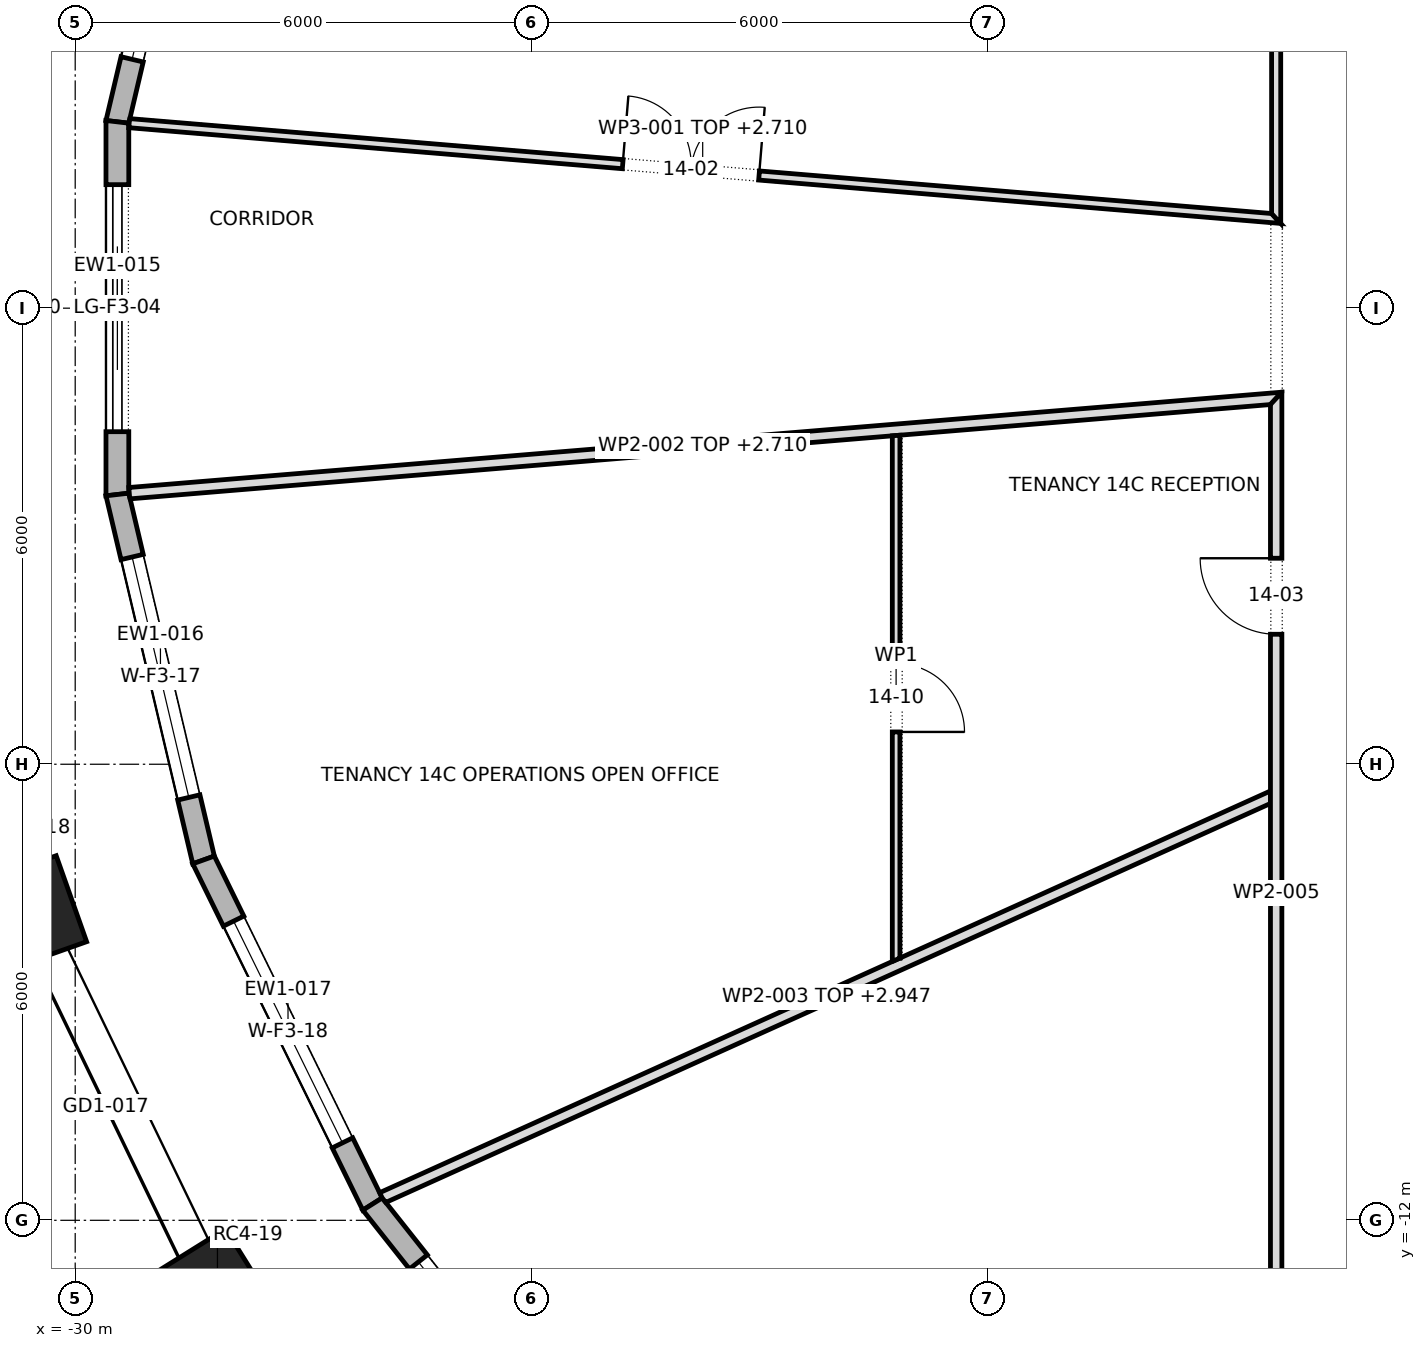
"""IFC4 building model, lengths in metres.
Left out: names, types, materials, properties, quantities, classifications, styles, units other than length and angle.
Written with IfcOpenShell. Run it as: python <this file> out.ifc"""

import sys

from ifc_helpers import new_model, si_unit, direction, frame, frame_2d, origin, origin_2d, place, context, subcontext, project, spatial, polyline, rectangle, outline, extrude, element, fill, save


model = new_model("IFC4")
c1 = context("Model", 3, precision=1e-05, world=origin(), true_north=direction((0.0, 1.0)))
c2 = subcontext(c1, "Body", "Model", "MODEL_VIEW")
j1 = project(units=[si_unit("LENGTHUNIT", "METRE"), si_unit("PLANEANGLEUNIT", "RADIAN")], contexts=[c1])
p1 = place(None, origin())
s1 = spatial("IfcSite", under=j1, at=p1, CompositionType="ELEMENT")
p2 = place(p1, origin())
s2 = spatial("IfcBuilding", under=s1, at=p2, CompositionType="ELEMENT")
p3 = place(p2, frame((0.0, 0.0, 210.9)))
s3 = spatial("IfcBuildingStorey", under=s2, at=p3, CompositionType="ELEMENT", Elevation=210.9)
for number, where, z_axis, x_axis in (
    (1, (-30.521, -7.936, 0.0), (0.0, 0.0, 1.0), (0.334, -0.943, 0.0)),
    (2, (-28.129, -12.887, 0.0), (0.0, 0.0, 1.0), (0.529, -0.849, 0.0)),
):
    element("IfcColumn", number, at=place(p3, frame(where, z_axis=z_axis, x_axis=x_axis)), inside=s3, PredefinedType="COLUMN", context=c2, shape_type="SweptSolid", body=[
        extrude(rectangle(XDim=1.2, YDim=1.0, at=origin_2d()), origin(), (0.0, 0.0, 1.0), 4.0),
    ])
p4 = place(p3, frame((-28.311, 7.259, 0.0), z_axis=(0.0, 0.0, 1.0), x_axis=(-0.229535186351, -0.973300363828, 0.0)))
e3 = element("IfcWall", 3, at=p4, inside=s3, PredefinedType="STANDARD", context=c2, shape_type="SweptSolid", body=[
    extrude(outline(polyline([(-0.017, -0.15), (4.957, -0.15), (4.922, 0.15), (0.017, 0.15), (-0.017, -0.15)])), origin(), (0.0, 0.0, 1.0), 3.7),
])
p5 = place(p4, frame((0.845, 0.0, 0.6)))
e4 = element("IfcOpeningElement", 4, at=p5, cuts=e3, PredefinedType="OPENING", context=c2, shape_type="SweptSolid", body=[
    extrude(rectangle(XDim=3.25, YDim=2.65, at=frame_2d((1.625, 1.325))), frame((0.0, 0.162, 0.0), z_axis=(0.0, -1.0, 0.0), x_axis=(1.0, 0.0, 0.0)), (0.0, 0.0, 1.0), 0.324),
])
p6 = place(p3, frame((-29.445, 2.451, 0.0), z_axis=(0.0, 0.0, 1.0), x_axis=(0.0, -1.0, 0.0)))
e5 = element("IfcWall", 5, at=p6, inside=s3, PredefinedType="STANDARD", context=c2, shape_type="SweptSolid", body=[
    extrude(outline(polyline([(-0.017, -0.15), (4.92, -0.15), (4.885, 0.15), (0.017, 0.15), (-0.017, -0.15)])), origin(), (0.0, 0.0, 1.0), 3.7),
])
p7 = place(p6, frame((0.826, 0.0, 0.0)))
e6 = element("IfcOpeningElement", 6, at=p7, cuts=e5, PredefinedType="OPENING", context=c2, shape_type="SweptSolid", body=[
    extrude(rectangle(XDim=3.25, YDim=3.25, at=frame_2d((1.625, 1.625))), frame((0.0, 0.162, 0.0), z_axis=(0.0, -1.0, 0.0), x_axis=(1.0, 0.0, 0.0)), (0.0, 0.0, 1.0), 0.324),
])
p8 = place(p3, frame((-29.445, -2.451, 0.0), z_axis=(0.0, 0.0, 1.0), x_axis=(0.229535186351, -0.973300363828, 0.0)))
e7 = element("IfcWall", 7, at=p8, inside=s3, PredefinedType="STANDARD", context=c2, shape_type="SweptSolid", body=[
    extrude(outline(polyline([(-0.017, -0.15), (4.956, -0.15), (4.923, 0.15), (0.017, 0.15), (-0.017, -0.15)])), origin(), (0.0, 0.0, 1.0), 3.7),
])
p9 = place(p8, frame((0.845, 0.0, 0.6)))
e8 = element("IfcOpeningElement", 8, at=p9, cuts=e7, PredefinedType="OPENING", context=c2, shape_type="SweptSolid", body=[
    extrude(rectangle(XDim=3.25, YDim=2.65, at=frame_2d((1.625, 1.325))), frame((0.0, 0.162, 0.0), z_axis=(0.0, -1.0, 0.0), x_axis=(1.0, 0.0, 0.0)), (0.0, 0.0, 1.0), 0.324),
])
p10 = place(p3, frame((-28.311, -7.259, 0.0), z_axis=(0.0, 0.0, 1.0), x_axis=(0.440773193145, -0.89761851151, 0.0)))
e9 = element("IfcWall", 9, at=p10, inside=s3, PredefinedType="STANDARD", context=c2, shape_type="SweptSolid", body=[
    extrude(outline(polyline([(-0.017, -0.15), (5.059, -0.15), (5.027, 0.15), (0.017, 0.15), (-0.017, -0.15)])), origin(), (0.0, 0.0, 1.0), 3.7),
])
p11 = place(p10, frame((0.896, 0.0, 0.6)))
e10 = element("IfcOpeningElement", 10, at=p11, cuts=e9, PredefinedType="OPENING", context=c2, shape_type="SweptSolid", body=[
    extrude(rectangle(XDim=3.25, YDim=2.65, at=frame_2d((1.625, 1.325))), frame((0.0, 0.162, 0.0), z_axis=(0.0, -1.0, 0.0), x_axis=(1.0, 0.0, 0.0)), (0.0, 0.0, 1.0), 0.324),
])
p12 = place(p3, frame((-26.088, -11.786, 0.0), z_axis=(0.0, 0.0, 1.0), x_axis=(0.620870264345, -0.783913333763, 0.0)))
e11 = element("IfcWall", 11, at=p12, inside=s3, PredefinedType="STANDARD", context=c2, shape_type="SweptSolid", body=[
    extrude(outline(polyline([(-0.016, -0.15), (5.21, -0.15), (5.179, 0.15), (0.016, 0.15), (-0.016, -0.15)])), origin(), (0.0, 0.0, 1.0), 3.7),
])
p13 = place(p12, frame((0.972, 0.0, 0.6)))
e12 = element("IfcOpeningElement", 12, at=p13, cuts=e11, PredefinedType="OPENING", context=c2, shape_type="SweptSolid", body=[
    extrude(rectangle(XDim=3.25, YDim=2.65, at=frame_2d((1.625, 1.325))), frame((0.0, 0.162, 0.0), z_axis=(0.0, -1.0, 0.0), x_axis=(1.0, 0.0, 0.0)), (0.0, 0.0, 1.0), 0.324),
])
p14 = place(p3, frame((-29.29, 2.434, 0.0), z_axis=(0.0, 0.0, 1.0), x_axis=(0.996564113419, -0.082824922852, 0.0)))
e13 = element("IfcWall", 13, at=p14, inside=s3, PredefinedType="PARTITIONING", context=c2, shape_type="SweptSolid", body=[
    extrude(outline(polyline([(15.207, -0.06), (15.207, -0.06), (15.207, -0.06), (15.207, -0.06), (15.142, 0.0), (15.077, 0.06), (13.192, 0.06), (11.308, 0.06), (9.424, 0.06), (7.54, 0.06), (5.656, 0.06), (3.772, 0.06), (1.888, 0.06), (0.004, 0.06), (0.0, 0.035), (0.0, -0.06), (1.901, -0.06), (3.802, -0.06), (5.703, -0.06), (7.604, -0.06), (9.504, -0.06), (11.405, -0.06), (13.306, -0.06), (15.207, -0.06)])), origin(), (0.0, 0.0, 1.0), 2.71),
])
p15 = place(p14, frame((6.515, 0.0, 0.0)))
e14 = element("IfcOpeningElement", 14, at=p15, cuts=e13, PredefinedType="OPENING", context=c2, shape_type="SweptSolid", body=[
    extrude(rectangle(XDim=1.8, YDim=2.1, at=frame_2d((0.9, 1.05))), frame((0.0, 0.072, 0.0), z_axis=(0.0, -1.0, 0.0), x_axis=(1.0, 0.0, 0.0)), (0.0, 0.0, 1.0), 0.144),
])
p16 = place(p3, frame((-29.288, -2.434, 0.0), z_axis=(0.0, 0.0, 1.0), x_axis=(0.9965984313, 0.082410962436, 0.0)))
e15 = element("IfcWall", 15, at=p16, inside=s3, PredefinedType="PARTITIONING", context=c2, shape_type="SweptSolid", body=[
    extrude(outline(polyline([(0.005, -0.075), (1.886, -0.075), (3.768, -0.075), (5.65, -0.075), (7.531, -0.075), (9.413, -0.075), (11.295, -0.075), (13.177, -0.075), (15.059, -0.075), (15.221, 0.075), (15.221, 0.075), (13.319, 0.075), (11.416, 0.075), (9.513, 0.075), (7.611, 0.075), (5.708, 0.075), (3.805, 0.075), (1.903, 0.075), (0.0, 0.075), (0.0, -0.044), (0.005, -0.075)])), origin(), (0.0, 0.0, 1.0), 2.71),
])
p17 = place(p3, frame((-25.963, -11.705, 0.0), z_axis=(0.0, 0.0, 1.0), x_axis=(0.911586477794, 0.41110837197, 0.0)))
e16 = element("IfcWall", 16, at=p17, inside=s3, PredefinedType="PARTITIONING", context=c2, shape_type="SweptSolid", body=[
    extrude(outline(polyline([(0.021, -0.075), (1.844, -0.075), (3.668, -0.075), (5.492, -0.075), (7.316, -0.075), (9.14, -0.075), (10.964, -0.075), (12.788, -0.075), (12.856, 0.075), (11.073, 0.075), (9.291, 0.075), (7.508, 0.075), (7.507, 0.073), (7.502, 0.075), (5.627, 0.075), (3.751, 0.075), (1.875, 0.075), (0.0, 0.075), (0.0, 0.062), (0.002, -0.001), (0.021, -0.075)])), origin(), (0.0, 0.0, 1.0), 2.947),
])
p18 = place(p3, frame((-19.2, -8.595, 0.0), z_axis=(0.0, 0.0, 1.0), x_axis=(0.0, 1.0, 0.0)))
e17 = element("IfcWall", 17, at=p18, inside=s3, PredefinedType="PARTITIONING", context=c2, shape_type="SweptSolid", body=[
    extrude(outline(polyline([(6.924, -0.05), (6.924, -0.047), (6.916, 0.05), (5.187, 0.05), (3.458, 0.05), (1.729, 0.05), (0.0, 0.05), (0.0, 0.05), (0.045, -0.05), (1.765, -0.05), (3.484, -0.05), (5.204, -0.05), (6.924, -0.05)])), origin(), (0.0, 0.0, 1.0), 3.7),
])
p19 = place(p18, frame((3.02, 0.0, 0.0)))
e18 = element("IfcOpeningElement", 18, at=p19, cuts=e17, PredefinedType="OPENING", context=c2, shape_type="SweptSolid", body=[
    extrude(rectangle(XDim=0.9, YDim=2.1, at=frame_2d((0.45, 1.05))), frame((0.0, 0.062, 0.0), z_axis=(0.0, -1.0, 0.0), x_axis=(1.0, 0.0, 0.0)), (0.0, 0.0, 1.0), 0.124),
])
p20 = place(p3, frame((-14.2, -14.275, 0.0), z_axis=(0.0, 0.0, 1.0), x_axis=(0.0, 1.0, 0.0)))
e19 = element("IfcWall", 19, at=p20, inside=s3, PredefinedType="PARTITIONING", context=c2, shape_type="SweptSolid", body=[
    extrude(outline(polyline([(0.15, -0.075), (2.01, -0.075), (3.87, -0.075), (5.73, -0.075), (7.59, -0.075), (9.45, -0.075), (11.31, -0.075), (13.17, -0.075), (13.007, 0.075), (11.149, 0.075), (9.291, 0.075), (7.433, 0.075), (5.574, 0.075), (3.716, 0.075), (1.858, 0.075), (0.0, 0.075), (0.15, -0.075)])), origin(), (0.0, 0.0, 1.0), 3.7),
])
p21 = place(p20, frame((9.985, 0.0, 0.0)))
e20 = element("IfcOpeningElement", 20, at=p21, cuts=e19, PredefinedType="OPENING", context=c2, shape_type="SweptSolid", body=[
    extrude(rectangle(XDim=1.0, YDim=2.1, at=frame_2d((0.5, 1.05))), frame((0.0, 0.087, 0.0), z_axis=(0.0, -1.0, 0.0), x_axis=(1.0, 0.0, 0.0)), (0.0, 0.0, 1.0), 0.174),
])
p22 = place(p3, frame((-14.2, 1.115, 0.0), z_axis=(0.0, 0.0, 1.0), x_axis=(0.0, 1.0, 0.0)))
e21 = element("IfcWall", 21, at=p22, inside=s3, PredefinedType="PARTITIONING", context=c2, shape_type="SweptSolid", body=[
    extrude(outline(polyline([(0.0, -0.06), (1.861, -0.06), (3.721, -0.06), (5.582, -0.06), (7.443, -0.06), (9.304, -0.06), (11.164, -0.06), (13.025, -0.06), (13.145, 0.06), (11.286, 0.06), (9.427, 0.06), (7.567, 0.06), (5.708, 0.06), (3.849, 0.06), (1.99, 0.06), (0.13, 0.06), (0.0, -0.06), (0.0, -0.06)])), origin(), (0.0, 0.0, 1.0), 3.7),
])
p23 = place(p5, origin())
e22 = element("IfcWindow", 22, at=p23, inside=s3, PartitioningType="TRIPLE_PANEL_VERTICAL", PredefinedType="WINDOW", context=c2, shape_type="SweptSolid", body=[
    extrude(rectangle(XDim=3.25, YDim=2.65, at=frame_2d((1.625, 1.325))), frame((0.0, 0.03, 0.0), z_axis=(0.0, -1.0, 0.0), x_axis=(1.0, 0.0, 0.0)), (0.0, 0.0, 1.0), 0.06),
])
fill(e4, e22)
p24 = place(p7, origin())
e23 = element("IfcDoor", 23, at=p24, inside=s3, OperationType="DOUBLE_DOOR_SLIDING", PredefinedType="DOOR", context=c2, shape_type="SweptSolid", body=[
    extrude(rectangle(XDim=3.25, YDim=3.25, at=frame_2d((1.625, 1.625))), frame((0.0, 0.025, 0.0), z_axis=(0.0, -1.0, 0.0), x_axis=(1.0, 0.0, 0.0)), (0.0, 0.0, 1.0), 0.05),
])
fill(e6, e23)
p25 = place(p9, origin())
e24 = element("IfcWindow", 24, at=p25, inside=s3, PartitioningType="TRIPLE_PANEL_VERTICAL", PredefinedType="WINDOW", context=c2, shape_type="SweptSolid", body=[
    extrude(rectangle(XDim=3.25, YDim=2.65, at=frame_2d((1.625, 1.325))), frame((0.0, 0.03, 0.0), z_axis=(0.0, -1.0, 0.0), x_axis=(1.0, 0.0, 0.0)), (0.0, 0.0, 1.0), 0.06),
])
fill(e8, e24)
p26 = place(p11, origin())
e25 = element("IfcWindow", 25, at=p26, inside=s3, PartitioningType="TRIPLE_PANEL_VERTICAL", PredefinedType="WINDOW", context=c2, shape_type="SweptSolid", body=[
    extrude(rectangle(XDim=3.25, YDim=2.65, at=frame_2d((1.625, 1.325))), frame((0.0, 0.03, 0.0), z_axis=(0.0, -1.0, 0.0), x_axis=(1.0, 0.0, 0.0)), (0.0, 0.0, 1.0), 0.06),
])
fill(e10, e25)
p27 = place(p13, origin())
e26 = element("IfcWindow", 26, at=p27, inside=s3, PartitioningType="TRIPLE_PANEL_VERTICAL", PredefinedType="WINDOW", context=c2, shape_type="SweptSolid", body=[
    extrude(rectangle(XDim=3.25, YDim=2.65, at=frame_2d((1.625, 1.325))), frame((0.0, 0.03, 0.0), z_axis=(0.0, -1.0, 0.0), x_axis=(1.0, 0.0, 0.0)), (0.0, 0.0, 1.0), 0.06),
])
fill(e12, e26)
p28 = place(p15, origin())
e27 = element("IfcDoor", 27, at=p28, inside=s3, OperationType="DOUBLE_DOOR_SINGLE_SWING", PredefinedType="DOOR", context=c2, shape_type="SweptSolid", body=[
    extrude(rectangle(XDim=1.8, YDim=2.1, at=frame_2d((0.9, 1.05))), frame((0.0, 0.025, 0.0), z_axis=(0.0, -1.0, 0.0), x_axis=(1.0, 0.0, 0.0)), (0.0, 0.0, 1.0), 0.05),
])
fill(e14, e27)
p29 = place(p21, origin())
e28 = element("IfcDoor", 28, at=p29, inside=s3, OperationType="SINGLE_SWING_LEFT", PredefinedType="DOOR", context=c2, shape_type="SweptSolid", body=[
    extrude(rectangle(XDim=1.0, YDim=2.1, at=frame_2d((0.5, 1.05))), frame((0.0, 0.025, 0.0), z_axis=(0.0, -1.0, 0.0), x_axis=(1.0, 0.0, 0.0)), (0.0, 0.0, 1.0), 0.05),
])
fill(e20, e28)
p30 = place(p19, frame((0.9, 0.0, 0.0), z_axis=(0.0, 0.0, 1.0), x_axis=(-1.0, 0.0, 0.0)))
e29 = element("IfcDoor", 29, at=p30, inside=s3, OperationType="SINGLE_SWING_LEFT", PredefinedType="DOOR", context=c2, shape_type="SweptSolid", body=[
    extrude(rectangle(XDim=0.9, YDim=2.1, at=frame_2d((0.45, 1.05))), frame((0.0, 0.025, 0.0), z_axis=(0.0, -1.0, 0.0), x_axis=(1.0, 0.0, 0.0)), (0.0, 0.0, 1.0), 0.05),
])
fill(e18, e29)
save(model, sys.argv[1])
